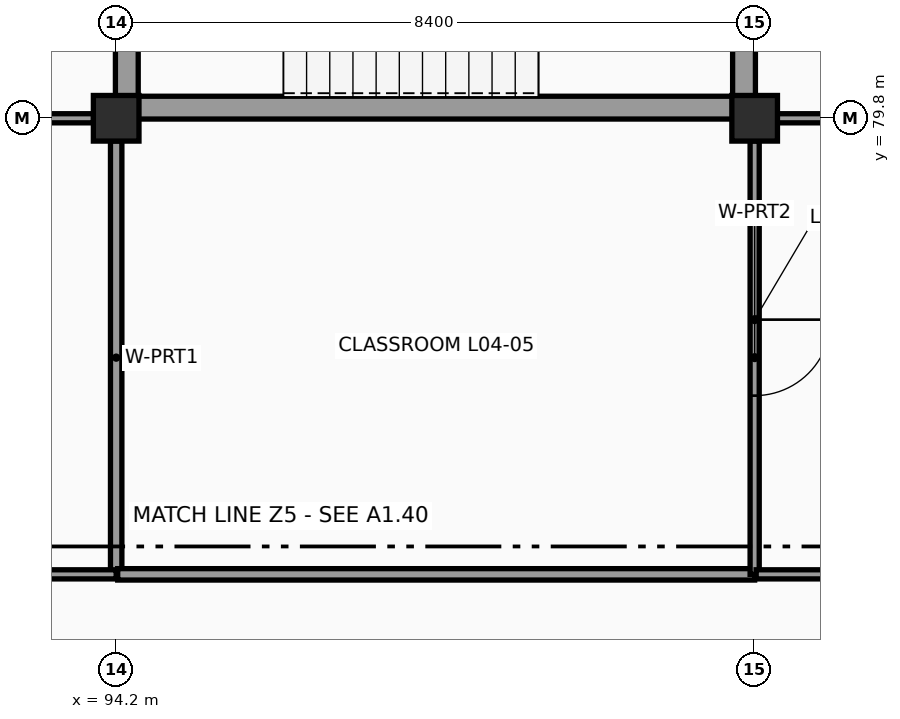
"""IFC4 building model, lengths in metres.
Left out: names, types, materials, properties, quantities, classifications, styles, units other than length and angle.
Written with IfcOpenShell. Run it as: python <this file> out.ifc"""

import sys

from ifc_helpers import new_model, si_unit, direction, frame, frame_2d, origin, origin_2d, place, context, subcontext, project, spatial, rectangle, extrude, element, fill, save


model = new_model("IFC4")
c1 = context("Model", 3, precision=1e-05, world=origin(), true_north=direction((0.0, 1.0)))
c2 = subcontext(c1, "Body", "Model", "MODEL_VIEW")
j1 = project(units=[si_unit("LENGTHUNIT", "METRE"), si_unit("PLANEANGLEUNIT", "RADIAN")], contexts=[c1])
p1 = place(None, origin())
s1 = spatial("IfcSite", under=j1, at=p1, CompositionType="ELEMENT")
p2 = place(p1, origin())
s2 = spatial("IfcBuilding", under=s1, at=p2, CompositionType="ELEMENT")
p3 = place(p2, frame((0.0, 0.0, 15.0)))
s3 = spatial("IfcBuildingStorey", under=s2, at=p3, CompositionType="ELEMENT", Elevation=15.0)
for number, where, z_axis, x_axis in (
    (1, (94.2, 79.8, 0.0), (0.0, 0.0, 1.0), (1.0, 0.0, 0.0)),
    (2, (102.6, 79.8, 0.0), (0.0, 0.0, 1.0), (1.0, 0.0, 0.0)),
):
    element("IfcColumn", number, at=place(p3, frame(where, z_axis=z_axis, x_axis=x_axis)), inside=s3, PredefinedType="COLUMN", context=c2, shape_type="SweptSolid", body=[
        extrude(rectangle(XDim=0.6, YDim=0.6, at=origin_2d()), origin(), (0.0, 0.0, 1.0), 3.6),
    ])
p4 = place(p3, frame((94.34, 79.94, 0.0), z_axis=(0.0, 0.0, 1.0), x_axis=(1.0, 0.0, 0.0)))
e3 = element("IfcWall", 3, at=p4, inside=s3, PredefinedType="SHEAR", context=c2, shape_type="SweptSolid", body=[
    extrude(rectangle(XDim=8.12, YDim=0.3, at=frame_2d((4.06, 0.0))), origin(), (0.0, 0.0, 1.0), 3.6),
])
for number, where, z_axis, x_axis in (
    (4, (102.46, 79.94, 0.0), (0.0, 0.0, 1.0), (0.0, 1.0, 0.0)),
    (5, (94.34, 84.22, 0.0), (0.0, 0.0, 1.0), (0.0, -1.0, 0.0)),
):
    element("IfcWall", number, at=place(p3, frame(where, z_axis=z_axis, x_axis=x_axis)), inside=s3, PredefinedType="SHEAR", context=c2, shape_type="SweptSolid", body=[
        extrude(rectangle(XDim=4.28, YDim=0.3, at=frame_2d((2.14, 0.0))), origin(), (0.0, 0.0, 1.0), 3.6),
    ])
p5 = place(p3, frame((106.8, 79.8, 0.0), z_axis=(0.0, 0.0, 1.0), x_axis=(-1.0, 0.0, 0.0)))
e6 = element("IfcWall", 6, at=p5, inside=s3, PredefinedType="PARTITIONING", context=c2, shape_type="SweptSolid", body=[
    extrude(rectangle(XDim=3.902, YDim=0.12, at=frame_2d((1.951, 0.0))), origin(), (0.0, 0.0, 1.0), 2.63),
])
p6 = place(p3, frame((86.098, 79.8, 0.0), z_axis=(0.0, 0.0, 1.0), x_axis=(1.0, 0.0, 0.0)))
e7 = element("IfcWall", 7, at=p6, inside=s3, PredefinedType="PARTITIONING", context=c2, shape_type="SweptSolid", body=[
    extrude(rectangle(XDim=7.804, YDim=0.12, at=frame_2d((3.902, 0.0))), origin(), (0.0, 0.0, 1.0), 2.7),
])
p7 = place(p3, frame((94.2, 79.502, 0.0), z_axis=(0.0, 0.0, 1.0), x_axis=(0.0, -1.0, 0.0)))
e8 = element("IfcWall", 8, at=p7, inside=s3, PredefinedType="PARTITIONING", context=c2, shape_type="SweptSolid", body=[
    extrude(rectangle(XDim=5.702, YDim=0.15, at=frame_2d((2.851, 0.0))), origin(), (0.0, 0.0, 1.0), 2.95),
])
p8 = place(p3, frame((94.2, 73.8, 0.0), z_axis=(0.0, 0.0, 1.0), x_axis=(-1.0, 0.0, 0.0)))
e9 = element("IfcWall", 9, at=p8, inside=s3, PredefinedType="PARTITIONING", context=c2, shape_type="SweptSolid", body=[
    extrude(rectangle(XDim=8.4, YDim=0.12, at=frame_2d((4.2, 0.0))), origin(), (0.0, 0.0, 1.0), 2.68),
])
p9 = place(p3, frame((102.6, 73.8, 0.0), z_axis=(0.0, 0.0, 1.0), x_axis=(-1.0, 0.0, 0.0)))
e10 = element("IfcWall", 10, at=p9, inside=s3, PredefinedType="PARTITIONING", context=c2, shape_type="SweptSolid", body=[
    extrude(rectangle(XDim=8.38, YDim=0.15, at=frame_2d((4.19, 0.0))), origin(), (0.0, 0.0, 1.0), 2.95),
])
p10 = place(p3, frame((102.6, 79.502, 0.0), z_axis=(0.0, 0.0, 1.0), x_axis=(0.0, -1.0, 0.0)))
e11 = element("IfcWall", 11, at=p10, inside=s3, PredefinedType="PARTITIONING", context=c2, shape_type="SweptSolid", body=[
    extrude(rectangle(XDim=5.702, YDim=0.12, at=frame_2d((2.851, 0.0))), origin(), (0.0, 0.0, 1.0), 2.99),
])
p11 = place(p10, frame((2.351, 0.0, 0.0)))
e12 = element("IfcOpeningElement", 12, at=p11, cuts=e11, PredefinedType="OPENING", context=c2, shape_type="SweptSolid", body=[
    extrude(rectangle(XDim=1.0, YDim=2.1, at=frame_2d((0.5, 1.05))), frame((0.0, 0.07, 0.0), z_axis=(0.0, -1.0, 0.0), x_axis=(1.0, 0.0, 0.0)), (0.0, 0.0, 1.0), 0.14),
])
p12 = place(p3, frame((110.577, 73.8, 0.0), z_axis=(0.0, 0.0, 1.0), x_axis=(-1.0, 0.0, 0.0)))
e13 = element("IfcWall", 13, at=p12, inside=s3, PredefinedType="PARTITIONING", context=c2, shape_type="SweptSolid", body=[
    extrude(rectangle(XDim=7.957, YDim=0.12, at=frame_2d((3.979, 0.0))), origin(), (0.0, 0.0, 1.0), 2.99),
])
p13 = place(p12, frame((3.279, 0.0, 0.0)))
e14 = element("IfcOpeningElement", 14, at=p13, cuts=e13, PredefinedType="OPENING", context=c2, shape_type="SweptSolid", body=[
    extrude(rectangle(XDim=1.4, YDim=2.2, at=frame_2d((0.7, 1.1))), frame((0.0, 0.07, 0.0), z_axis=(0.0, -1.0, 0.0), x_axis=(1.0, 0.0, 0.0)), (0.0, 0.0, 1.0), 0.14),
])
p14 = place(p11, origin())
e15 = element("IfcDoor", 15, at=p14, inside=s3, OperationType="SINGLE_SWING_LEFT", PredefinedType="DOOR", context=c2, shape_type="SweptSolid", body=[
    extrude(rectangle(XDim=1.0, YDim=2.1, at=frame_2d((0.5, 1.05))), frame((0.0, 0.025, 0.0), z_axis=(0.0, -1.0, 0.0), x_axis=(1.0, 0.0, 0.0)), (0.0, 0.0, 1.0), 0.05),
])
fill(e12, e15)
save(model, sys.argv[1])
